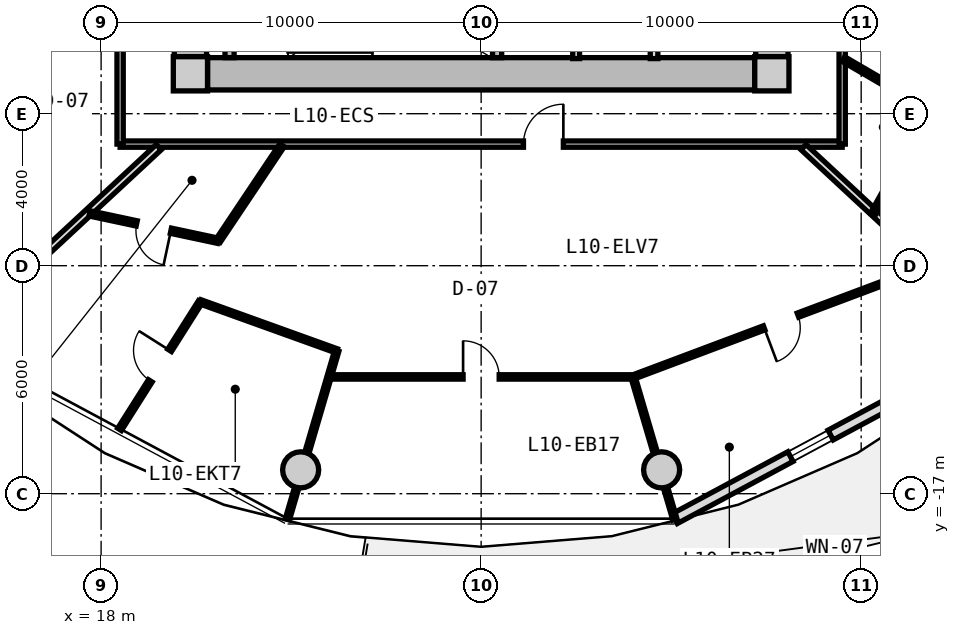
"""IFC4 building model, lengths in metres.
Left out: names, types, materials, properties, quantities, classifications, styles, units other than length and angle.
Written with IfcOpenShell. Run it as: python <this file> out.ifc"""

import sys

from ifc_helpers import new_model, si_unit, direction, frame, frame_2d, origin, origin_2d, place, context, subcontext, project, spatial, rectangle, circle, extrude, source, transform, mapped, element, fill, save


model = new_model("IFC4")
c1 = context("Model", 3, precision=1e-05, world=origin(), true_north=direction((0.0, 1.0)))
c2 = subcontext(c1, "Body", "Model", "MODEL_VIEW")
j1 = project(units=[si_unit("LENGTHUNIT", "METRE"), si_unit("PLANEANGLEUNIT", "RADIAN")], contexts=[c1])
p1 = place(None, origin())
s1 = spatial("IfcSite", under=j1, at=p1, CompositionType="ELEMENT")
p2 = place(p1, origin())
s2 = spatial("IfcBuilding", under=s1, at=p2, CompositionType="ELEMENT")
p3 = place(p2, frame((0.0, 0.0, 36.85)))
s3 = spatial("IfcBuildingStorey", under=s2, at=p3, CompositionType="ELEMENT", Elevation=36.85)
m1 = source(origin(), c2, "Body", "SweptSolid", [
    extrude(rectangle(XDim=0.9, YDim=0.9, at=origin_2d()), origin(), (0.0, 0.0, 1.0), 3.05),
])
for number, where, z_axis, x_axis in (
    (1, (20.35, -5.95, 0.0), (0.0, 0.0, 1.0), (1.0, 0.0, 0.0)),
    (2, (35.65, -5.95, 0.0), (0.0, 0.0, 1.0), (1.0, 0.0, 0.0)),
):
    element("IfcColumn", number, at=place(p3, frame(where, z_axis=z_axis, x_axis=x_axis)), inside=s3, PredefinedType="COLUMN", context=c2, shape_type="MappedRepresentation", body=[
        mapped(m1, transform((0.0, 0.0, 0.0), x_axis=(1.0, 0.0, 0.0), y_axis=(0.0, 1.0, 0.0), z_axis=(0.0, 0.0, 1.0), scale=1.0)),
    ])
m2 = source(origin(), c2, "Body", "SweptSolid", [
    extrude(rectangle(XDim=14.4, YDim=0.85, at=frame_2d((7.2, 0.0))), origin(), (0.0, 0.0, 1.0), 2.79),
])
p4 = place(p3, frame((35.2, -5.95, 0.0), z_axis=(0.0, 0.0, 1.0), x_axis=(-1.0, 0.0, 0.0)))
e3 = element("IfcWall", 3, at=p4, inside=s3, PredefinedType="SHEAR", context=c2, shape_type="MappedRepresentation", body=[
    mapped(m2, transform((0.0, 0.0, 0.0), x_axis=(1.0, 0.0, 0.0), y_axis=(0.0, 1.0, 0.0), z_axis=(0.0, 0.0, 1.0), scale=1.0)),
])
m3 = source(origin(), c2, "Body", "SweptSolid", [
    extrude(rectangle(XDim=11.0, YDim=0.85, at=frame_2d((5.5, 0.0))), origin(), (0.0, 0.0, 1.0), 2.79),
])
p5 = place(p3, frame((20.35, -5.5, 0.0), z_axis=(0.0, 0.0, 1.0), x_axis=(0.0, 1.0, 0.0)))
e4 = element("IfcWall", 4, at=p5, inside=s3, PredefinedType="SHEAR", context=c2, shape_type="MappedRepresentation", body=[
    mapped(m3, transform((0.0, 0.0, 0.0), x_axis=(1.0, 0.0, 0.0), y_axis=(0.0, 1.0, 0.0), z_axis=(0.0, 0.0, 1.0), scale=1.0)),
])
p6 = place(p5, frame((3.8, 0.0, 0.0)))
e5 = element("IfcOpeningElement", 5, at=p6, cuts=e4, PredefinedType="OPENING", context=c2, shape_type="SweptSolid", body=[
    extrude(rectangle(XDim=1.2, YDim=2.15, at=frame_2d((0.6, 1.075))), frame((0.0, 0.435, 0.0), z_axis=(0.0, -1.0, 0.0), x_axis=(1.0, 0.0, 0.0)), (0.0, 0.0, 1.0), 0.87),
])
p7 = place(p3, frame((35.65, 5.5, 0.0), z_axis=(0.0, 0.0, 1.0), x_axis=(0.0, -1.0, 0.0)))
e6 = element("IfcWall", 6, at=p7, inside=s3, PredefinedType="SHEAR", context=c2, shape_type="MappedRepresentation", body=[
    mapped(m3, transform((0.0, 0.0, 0.0), x_axis=(1.0, 0.0, 0.0), y_axis=(0.0, 1.0, 0.0), z_axis=(0.0, 0.0, 1.0), scale=1.0)),
])
p8 = place(p7, frame((5.65, 0.0, 0.0)))
e7 = element("IfcOpeningElement", 7, at=p8, cuts=e6, PredefinedType="OPENING", context=c2, shape_type="SweptSolid", body=[
    extrude(rectangle(XDim=1.2, YDim=2.15, at=frame_2d((0.6, 1.075))), frame((0.0, 0.435, 0.0), z_axis=(0.0, -1.0, 0.0), x_axis=(1.0, 0.0, 0.0)), (0.0, 0.0, 1.0), 0.87),
])
p9 = place(p7, frame((9.3, 0.0, 0.0)))
e8 = element("IfcOpeningElement", 8, at=p9, cuts=e6, PredefinedType="OPENING", context=c2, shape_type="SweptSolid", body=[
    extrude(rectangle(XDim=1.0, YDim=2.1, at=frame_2d((0.5, 1.05))), frame((0.0, 0.435, 0.0), z_axis=(0.0, -1.0, 0.0), x_axis=(1.0, 0.0, 0.0)), (0.0, 0.0, 1.0), 0.87),
])
m4 = source(origin(), c2, "Body", "SweptSolid", [
    extrude(circle(Radius=0.475, at=origin_2d()), origin(), (0.0, 0.0, 1.0), 3.05),
])
for number, where, z_axis, x_axis in (
    (9, (23.251, -16.373, 0.0), (0.0, 0.0, 1.0), (1.0, 0.0, 0.0)),
    (10, (32.749, -16.373, 0.0), (0.0, 0.0, 1.0), (1.0, 0.0, 0.0)),
):
    element("IfcColumn", number, at=place(p3, frame(where, z_axis=z_axis, x_axis=x_axis)), inside=s3, PredefinedType="COLUMN", context=c2, shape_type="MappedRepresentation", body=[
        mapped(m4, transform((0.0, 0.0, 0.0), x_axis=(1.0, 0.0, 0.0), y_axis=(0.0, 1.0, 0.0), z_axis=(0.0, 0.0, 1.0), scale=1.0)),
    ])
m5 = source(origin(), c2, "Body", "SweptSolid", [
    extrude(rectangle(XDim=10.011, YDim=0.29, at=frame_2d((5.005, 0.0))), origin(), (0.0, 0.0, 1.0), 2.79),
])
p10 = place(p3, frame((41.916, -12.926, 0.0), z_axis=(0.0, 0.0, 1.0), x_axis=(-0.881272505317, -0.472608475773, 0.0)))
e11 = element("IfcWall", 11, at=p10, inside=s3, PredefinedType="SOLIDWALL", context=c2, shape_type="MappedRepresentation", body=[
    mapped(m5, transform((0.0, 0.0, 0.0), x_axis=(1.0, 0.0, 0.0), y_axis=(0.0, 1.0, 0.0), z_axis=(0.0, 0.0, 1.0), scale=1.0)),
])
p11 = place(p10, frame((1.06, 0.0, 0.0)))
e12 = element("IfcOpeningElement", 12, at=p11, cuts=e11, PredefinedType="OPENING", context=c2, shape_type="SweptSolid", body=[
    extrude(rectangle(XDim=1.15, YDim=2.25, at=frame_2d((0.575, 1.125))), frame((0.0, 0.155, 0.0), z_axis=(0.0, -1.0, 0.0), x_axis=(1.0, 0.0, 0.0)), (0.0, 0.0, 1.0), 0.31),
])
p12 = place(p10, frame((5.355, 0.0, 0.85)))
e13 = element("IfcOpeningElement", 13, at=p12, cuts=e11, PredefinedType="OPENING", context=c2, shape_type="SweptSolid", body=[
    extrude(rectangle(XDim=1.2, YDim=1.5, at=frame_2d((0.6, 0.75))), frame((0.0, 0.155, 0.0), z_axis=(0.0, -1.0, 0.0), x_axis=(1.0, 0.0, 0.0)), (0.0, 0.0, 1.0), 0.31),
])
m6 = source(origin(), c2, "Body", "SweptSolid", [
    extrude(rectangle(XDim=3.075, YDim=0.24, at=frame_2d((1.538, 0.0))), origin(), (0.0, 0.0, 1.0), 2.79),
])
for number, where, z_axis, x_axis in (
    (14, (21.38, -5.525, 0.0), (0.0, 0.0, 1.0), (0.0, 1.0, 0.0)),
    (15, (28.42, -5.525, 0.0), (0.0, 0.0, 1.0), (0.0, 1.0, 0.0)),
):
    element("IfcWall", number, at=place(p3, frame(where, z_axis=z_axis, x_axis=x_axis)), inside=s3, PredefinedType="PARTITIONING", context=c2, shape_type="MappedRepresentation", body=[
        mapped(m6, transform((0.0, 0.0, 0.0), x_axis=(1.0, 0.0, 0.0), y_axis=(0.0, 1.0, 0.0), z_axis=(0.0, 0.0, 1.0), scale=1.0)),
    ])
m7 = source(origin(), c2, "Body", "SweptSolid", [
    extrude(rectangle(XDim=3.8, YDim=0.2, at=frame_2d((1.9, 0.0))), origin(), (0.0, 0.0, 1.0), 2.775),
])
p13 = place(p3, frame((32.55, -5.55, 0.0), z_axis=(0.0, 0.0, 1.0), x_axis=(0.0, 1.0, 0.0)))
e16 = element("IfcWall", 16, at=p13, inside=s3, PredefinedType="PARTITIONING", context=c2, shape_type="MappedRepresentation", body=[
    mapped(m7, transform((0.0, 0.0, 0.0), x_axis=(1.0, 0.0, 0.0), y_axis=(0.0, 1.0, 0.0), z_axis=(0.0, 0.0, 1.0), scale=1.0)),
])
m8 = source(origin(), c2, "Body", "SweptSolid", [
    extrude(rectangle(XDim=3.22, YDim=0.18, at=frame_2d((1.61, 0.0))), origin(), (0.0, 0.0, 1.0), 2.775),
])
p14 = place(p3, frame((30.5, -5.55, 0.0), z_axis=(0.0, 0.0, 1.0), x_axis=(0.0, 1.0, 0.0)))
e17 = element("IfcWall", 17, at=p14, inside=s3, PredefinedType="PARTITIONING", context=c2, shape_type="MappedRepresentation", body=[
    mapped(m8, transform((0.0, 0.0, 0.0), x_axis=(1.0, 0.0, 0.0), y_axis=(0.0, 1.0, 0.0), z_axis=(0.0, 0.0, 1.0), scale=1.0)),
])
m9 = source(origin(), c2, "Body", "SweptSolid", [
    extrude(rectangle(XDim=19.0, YDim=0.165, at=frame_2d((9.5, 0.0))), origin(), (0.0, 0.0, 1.0), 2.775),
])
p15 = place(p3, frame((37.5, -7.8, 0.0), z_axis=(0.0, 0.0, 1.0), x_axis=(-1.0, 0.0, 0.0)))
e18 = element("IfcWall", 18, at=p15, inside=s3, PredefinedType="PARTITIONING", context=c2, shape_type="MappedRepresentation", body=[
    mapped(m9, transform((0.0, 0.0, 0.0), x_axis=(1.0, 0.0, 0.0), y_axis=(0.0, 1.0, 0.0), z_axis=(0.0, 0.0, 1.0), scale=1.0)),
])
p16 = place(p15, frame((7.336, 0.0, 0.0)))
e19 = element("IfcOpeningElement", 19, at=p16, cuts=e18, PredefinedType="OPENING", context=c2, shape_type="SweptSolid", body=[
    extrude(rectangle(XDim=1.05, YDim=2.15, at=frame_2d((0.525, 1.075))), frame((0.0, 0.093, 0.0), z_axis=(0.0, -1.0, 0.0), x_axis=(1.0, 0.0, 0.0)), (0.0, 0.0, 1.0), 0.185),
])
m10 = source(origin(), c2, "Body", "SweptSolid", [
    extrude(rectangle(XDim=15.6, YDim=0.165, at=frame_2d((7.8, 0.0))), origin(), (0.0, 0.0, 1.0), 2.775),
])
p17 = place(p3, frame((18.5, -7.8, 0.0), z_axis=(0.0, 0.0, 1.0), x_axis=(0.0, 1.0, 0.0)))
e20 = element("IfcWall", 20, at=p17, inside=s3, PredefinedType="PARTITIONING", context=c2, shape_type="MappedRepresentation", body=[
    mapped(m10, transform((0.0, 0.0, 0.0), x_axis=(1.0, 0.0, 0.0), y_axis=(0.0, 1.0, 0.0), z_axis=(0.0, 0.0, 1.0), scale=1.0)),
])
p18 = place(p17, frame((12.141, 0.0, 0.0)))
e21 = element("IfcOpeningElement", 21, at=p18, cuts=e20, PredefinedType="OPENING", context=c2, shape_type="SweptSolid", body=[
    extrude(rectangle(XDim=1.25, YDim=2.2, at=frame_2d((0.625, 1.1))), frame((0.0, 0.093, 0.0), z_axis=(0.0, -1.0, 0.0), x_axis=(1.0, 0.0, 0.0)), (0.0, 0.0, 1.0), 0.185),
])
p19 = place(p17, frame((3.63, 0.0, 0.0)))
e22 = element("IfcOpeningElement", 22, at=p19, cuts=e20, PredefinedType="OPENING", context=c2, shape_type="SweptSolid", body=[
    extrude(rectangle(XDim=1.05, YDim=2.15, at=frame_2d((0.525, 1.075))), frame((0.0, 0.093, 0.0), z_axis=(0.0, -1.0, 0.0), x_axis=(1.0, 0.0, 0.0)), (0.0, 0.0, 1.0), 0.185),
])
p20 = place(p3, frame((37.5, 7.8, 0.0), z_axis=(0.0, 0.0, 1.0), x_axis=(0.0, -1.0, 0.0)))
e23 = element("IfcWall", 23, at=p20, inside=s3, PredefinedType="PARTITIONING", context=c2, shape_type="MappedRepresentation", body=[
    mapped(m10, transform((0.0, 0.0, 0.0), x_axis=(1.0, 0.0, 0.0), y_axis=(0.0, 1.0, 0.0), z_axis=(0.0, 0.0, 1.0), scale=1.0)),
])
p21 = place(p20, frame((6.269, 0.0, 0.0)))
e24 = element("IfcOpeningElement", 24, at=p21, cuts=e23, PredefinedType="OPENING", context=c2, shape_type="SweptSolid", body=[
    extrude(rectangle(XDim=1.05, YDim=2.15, at=frame_2d((0.525, 1.075))), frame((0.0, 0.093, 0.0), z_axis=(0.0, -1.0, 0.0), x_axis=(1.0, 0.0, 0.0)), (0.0, 0.0, 1.0), 0.185),
])
m11 = source(origin(), c2, "Body", "SweptSolid", [
    extrude(rectangle(XDim=7.435, YDim=0.19, at=frame_2d((3.717, 0.0))), origin(), (0.0, 0.0, 1.0), 2.225),
])
for number, where, z_axis, x_axis in (
    (25, (19.517, -7.88, 0.0), (0.0, 0.0, 1.0), (-0.733, -0.681, 0.0)),
    (26, (36.483, -7.88, 0.0), (0.0, 0.0, 1.0), (0.733, -0.681, 0.0)),
):
    element("IfcWall", number, at=place(p3, frame(where, z_axis=z_axis, x_axis=x_axis)), inside=s3, PredefinedType="PARTITIONING", context=c2, shape_type="MappedRepresentation", body=[
        mapped(m11, transform((0.0, 0.0, 0.0), x_axis=(1.0, 0.0, 0.0), y_axis=(0.0, 1.0, 0.0), z_axis=(0.0, 0.0, 1.0), scale=1.0)),
    ])
m12 = source(origin(), c2, "Body", "SweptSolid", [
    extrude(rectangle(XDim=7.993, YDim=0.115, at=frame_2d((3.996, 0.0))), origin(), (0.0, 0.0, 1.0), 2.775),
])
p22 = place(p3, frame((24.004, -13.927, 0.0), z_axis=(0.0, 0.0, 1.0), x_axis=(1.0, 0.0, 0.0)))
e27 = element("IfcWall", 27, at=p22, inside=s3, PredefinedType="PARTITIONING", context=c2, shape_type="MappedRepresentation", body=[
    mapped(m12, transform((0.0, 0.0, 0.0), x_axis=(1.0, 0.0, 0.0), y_axis=(0.0, 1.0, 0.0), z_axis=(0.0, 0.0, 1.0), scale=1.0)),
])
p23 = place(p22, frame((3.521, 0.0, 0.0)))
e28 = element("IfcOpeningElement", 28, at=p23, cuts=e27, PredefinedType="OPENING", context=c2, shape_type="SweptSolid", body=[
    extrude(rectangle(XDim=0.95, YDim=2.1, at=frame_2d((0.475, 1.05))), frame((0.0, 0.067, 0.0), z_axis=(0.0, -1.0, 0.0), x_axis=(1.0, 0.0, 0.0)), (0.0, 0.0, 1.0), 0.135),
])
m13 = source(origin(), c2, "Body", "SweptSolid", [
    extrude(rectangle(XDim=4.625, YDim=0.115, at=frame_2d((2.312, 0.0))), origin(), (0.0, 0.0, 1.0), 2.225),
])
p24 = place(p3, frame((24.201, -13.239, 0.0), z_axis=(0.0, 0.0, 1.0), x_axis=(-0.2810742844, -0.959686014616, 0.0)))
e29 = element("IfcWall", 29, at=p24, inside=s3, PredefinedType="PARTITIONING", context=c2, shape_type="MappedRepresentation", body=[
    mapped(m13, transform((0.0, 0.0, 0.0), x_axis=(1.0, 0.0, 0.0), y_axis=(0.0, 1.0, 0.0), z_axis=(0.0, 0.0, 1.0), scale=1.0)),
])
m14 = source(origin(), c2, "Body", "SweptSolid", [
    extrude(rectangle(XDim=8.32, YDim=0.115, at=frame_2d((4.16, 0.0))), origin(), (0.0, 0.0, 1.0), 2.775),
])
p25 = place(p3, frame((31.997, -13.93, 0.0), z_axis=(0.0, 0.0, 1.0), x_axis=(0.936180763098, 0.351518959382, 0.0)))
e30 = element("IfcWall", 30, at=p25, inside=s3, PredefinedType="PARTITIONING", context=c2, shape_type="MappedRepresentation", body=[
    mapped(m14, transform((0.0, 0.0, 0.0), x_axis=(1.0, 0.0, 0.0), y_axis=(0.0, 1.0, 0.0), z_axis=(0.0, 0.0, 1.0), scale=1.0)),
])
p26 = place(p25, frame((3.685, 0.0, 0.0)))
e31 = element("IfcOpeningElement", 31, at=p26, cuts=e30, PredefinedType="OPENING", context=c2, shape_type="SweptSolid", body=[
    extrude(rectangle(XDim=0.95, YDim=2.1, at=frame_2d((0.475, 1.05))), frame((0.0, 0.067, 0.0), z_axis=(0.0, -1.0, 0.0), x_axis=(1.0, 0.0, 0.0)), (0.0, 0.0, 1.0), 0.135),
])
m15 = source(origin(), c2, "Body", "SweptSolid", [
    extrude(rectangle(XDim=3.905, YDim=0.115, at=frame_2d((1.952, 0.0))), origin(), (0.0, 0.0, 1.0), 2.225),
])
p27 = place(p3, frame((31.997, -13.93, 0.0), z_axis=(0.0, 0.0, 1.0), x_axis=(0.282037692958, -0.959403324859, 0.0)))
e32 = element("IfcWall", 32, at=p27, inside=s3, PredefinedType="PARTITIONING", context=c2, shape_type="MappedRepresentation", body=[
    mapped(m15, transform((0.0, 0.0, 0.0), x_axis=(1.0, 0.0, 0.0), y_axis=(0.0, 1.0, 0.0), z_axis=(0.0, 0.0, 1.0), scale=1.0)),
])
m16 = source(origin(), c2, "Body", "SweptSolid", [
    extrude(rectangle(XDim=3.025, YDim=0.14, at=frame_2d((1.513, 0.0))), origin(), (0.0, 0.0, 1.0), 2.775),
])
p28 = place(p3, frame((22.76, -7.83, 0.0), z_axis=(0.0, 0.0, 1.0), x_axis=(-0.556189165904, -0.831055721195, 0.0)))
e33 = element("IfcWall", 33, at=p28, inside=s3, PredefinedType="PARTITIONING", context=c2, shape_type="MappedRepresentation", body=[
    mapped(m16, transform((0.0, 0.0, 0.0), x_axis=(1.0, 0.0, 0.0), y_axis=(0.0, 1.0, 0.0), z_axis=(0.0, 0.0, 1.0), scale=1.0)),
])
m17 = source(origin(), c2, "Body", "SweptSolid", [
    extrude(rectangle(XDim=3.459, YDim=0.14, at=frame_2d((1.729, 0.0))), origin(), (0.0, 0.0, 1.0), 2.775),
])
p29 = place(p3, frame((21.078, -10.344, 0.0), z_axis=(0.0, 0.0, 1.0), x_axis=(-0.978006468578, 0.208574560815, 0.0)))
e34 = element("IfcWall", 34, at=p29, inside=s3, PredefinedType="PARTITIONING", context=c2, shape_type="MappedRepresentation", body=[
    mapped(m17, transform((0.0, 0.0, 0.0), x_axis=(1.0, 0.0, 0.0), y_axis=(0.0, 1.0, 0.0), z_axis=(0.0, 0.0, 1.0), scale=1.0)),
])
p30 = place(p29, frame((1.27, 0.0, 0.0)))
e35 = element("IfcOpeningElement", 35, at=p30, cuts=e34, PredefinedType="OPENING", context=c2, shape_type="SweptSolid", body=[
    extrude(rectangle(XDim=0.92, YDim=2.1, at=frame_2d((0.46, 1.05))), frame((0.0, 0.08, 0.0), z_axis=(0.0, -1.0, 0.0), x_axis=(1.0, 0.0, 0.0)), (0.0, 0.0, 1.0), 0.16),
])
m18 = source(origin(), c2, "Body", "SweptSolid", [
    extrude(rectangle(XDim=3.974, YDim=0.115, at=frame_2d((1.987, 0.0))), origin(), (0.0, 0.0, 1.0), 2.775),
])
p31 = place(p3, frame((20.611, -11.95, 0.0), z_axis=(0.0, 0.0, 1.0), x_axis=(-0.534810918023, -0.844971764003, 0.0)))
e36 = element("IfcWall", 36, at=p31, inside=s3, PredefinedType="PARTITIONING", context=c2, shape_type="MappedRepresentation", body=[
    mapped(m18, transform((0.0, 0.0, 0.0), x_axis=(1.0, 0.0, 0.0), y_axis=(0.0, 1.0, 0.0), z_axis=(0.0, 0.0, 1.0), scale=1.0)),
])
p32 = place(p31, frame((1.512, 0.0, 0.0)))
e37 = element("IfcOpeningElement", 37, at=p32, cuts=e36, PredefinedType="OPENING", context=c2, shape_type="SweptSolid", body=[
    extrude(rectangle(XDim=0.95, YDim=2.1, at=frame_2d((0.475, 1.05))), frame((0.0, 0.067, 0.0), z_axis=(0.0, -1.0, 0.0), x_axis=(1.0, 0.0, 0.0)), (0.0, 0.0, 1.0), 0.135),
])
m19 = source(origin(), c2, "Body", "SweptSolid", [
    extrude(rectangle(XDim=3.814, YDim=0.115, at=frame_2d((1.907, 0.0))), origin(), (0.0, 0.0, 1.0), 2.775),
])
p33 = place(p3, frame((20.611, -11.95, 0.0), z_axis=(0.0, 0.0, 1.0), x_axis=(0.940935542004, -0.338585743637, 0.0)))
e38 = element("IfcWall", 38, at=p33, inside=s3, PredefinedType="PARTITIONING", context=c2, shape_type="MappedRepresentation", body=[
    mapped(m19, transform((0.0, 0.0, 0.0), x_axis=(1.0, 0.0, 0.0), y_axis=(0.0, 1.0, 0.0), z_axis=(0.0, 0.0, 1.0), scale=1.0)),
])
m20 = source(origin(), c2, "Body", "SweptSolid", [
    extrude(rectangle(XDim=2.669, YDim=0.14, at=frame_2d((1.335, 0.0))), origin(), (0.0, 0.0, 1.0), 2.775),
])
p34 = place(p3, frame((37.53, -5.561, 0.0), z_axis=(0.0, 0.0, 1.0), x_axis=(0.86369928178, -0.50400749067, 0.0)))
e39 = element("IfcWall", 39, at=p34, inside=s3, PredefinedType="PARTITIONING", context=c2, shape_type="MappedRepresentation", body=[
    mapped(m20, transform((0.0, 0.0, 0.0), x_axis=(1.0, 0.0, 0.0), y_axis=(0.0, 1.0, 0.0), z_axis=(0.0, 0.0, 1.0), scale=1.0)),
])
m21 = source(origin(), c2, "Body", "SweptSolid", [
    extrude(rectangle(XDim=3.121, YDim=0.14, at=frame_2d((1.561, 0.0))), origin(), (0.0, 0.0, 1.0), 2.775),
])
p35 = place(p3, frame((39.836, -6.906, 0.0), z_axis=(0.0, 0.0, 1.0), x_axis=(-0.487302357327, -0.873233309342, 0.0)))
e40 = element("IfcWall", 40, at=p35, inside=s3, PredefinedType="PARTITIONING", context=c2, shape_type="MappedRepresentation", body=[
    mapped(m21, transform((0.0, 0.0, 0.0), x_axis=(1.0, 0.0, 0.0), y_axis=(0.0, 1.0, 0.0), z_axis=(0.0, 0.0, 1.0), scale=1.0)),
])
p36 = place(p35, frame((1.101, 0.0, 0.0)))
e41 = element("IfcOpeningElement", 41, at=p36, cuts=e40, PredefinedType="OPENING", context=c2, shape_type="SweptSolid", body=[
    extrude(rectangle(XDim=0.92, YDim=2.1, at=frame_2d((0.46, 1.05))), frame((0.0, 0.08, 0.0), z_axis=(0.0, -1.0, 0.0), x_axis=(1.0, 0.0, 0.0)), (0.0, 0.0, 1.0), 0.16),
])
m22 = source(origin(), c2, "Body", "SweptSolid", [
    extrude(rectangle(XDim=1.2, YDim=1.5, at=frame_2d((0.6, 0.75))), frame((0.0, 0.03, 0.0), z_axis=(0.0, -1.0, 0.0), x_axis=(1.0, 0.0, 0.0)), (0.0, 0.0, 1.0), 0.06),
])
p37 = place(p12, origin())
e42 = element("IfcWindow", 42, at=p37, inside=s3, PartitioningType="SINGLE_PANEL", PredefinedType="WINDOW", context=c2, shape_type="MappedRepresentation", body=[
    mapped(m22, transform((0.0, 0.0, 0.0), x_axis=(1.0, 0.0, 0.0), y_axis=(0.0, 1.0, 0.0), z_axis=(0.0, 0.0, 1.0), scale=1.0)),
])
fill(e13, e42)
m23 = source(origin(), c2, "Body", "SweptSolid", [
    extrude(rectangle(XDim=1.05, YDim=2.15, at=frame_2d((0.525, 1.075))), frame((0.0, 0.025, 0.0), z_axis=(0.0, -1.0, 0.0), x_axis=(1.0, 0.0, 0.0)), (0.0, 0.0, 1.0), 0.05),
])
p38 = place(p16, frame((1.05, 0.0, 0.0), z_axis=(0.0, 0.0, 1.0), x_axis=(-1.0, 0.0, 0.0)))
e43 = element("IfcDoor", 43, at=p38, inside=s3, OperationType="SINGLE_SWING_RIGHT", PredefinedType="DOOR", context=c2, shape_type="MappedRepresentation", body=[
    mapped(m23, transform((0.0, 0.0, 0.0), x_axis=(1.0, 0.0, 0.0), y_axis=(0.0, 1.0, 0.0), z_axis=(0.0, 0.0, 1.0), scale=1.0)),
])
fill(e19, e43)
m24 = source(origin(), c2, "Body", "SweptSolid", [
    extrude(rectangle(XDim=0.92, YDim=2.1, at=frame_2d((0.46, 1.05))), frame((0.0, 0.025, 0.0), z_axis=(0.0, -1.0, 0.0), x_axis=(1.0, 0.0, 0.0)), (0.0, 0.0, 1.0), 0.05),
])
p39 = place(p30, origin())
e44 = element("IfcDoor", 44, at=p39, inside=s3, OperationType="SINGLE_SWING_LEFT", PredefinedType="DOOR", context=c2, shape_type="MappedRepresentation", body=[
    mapped(m24, transform((0.0, 0.0, 0.0), x_axis=(1.0, 0.0, 0.0), y_axis=(0.0, 1.0, 0.0), z_axis=(0.0, 0.0, 1.0), scale=1.0)),
])
fill(e35, e44)
m25 = source(origin(), c2, "Body", "SweptSolid", [
    extrude(rectangle(XDim=0.95, YDim=2.1, at=frame_2d((0.475, 1.05))), frame((0.0, 0.025, 0.0), z_axis=(0.0, -1.0, 0.0), x_axis=(1.0, 0.0, 0.0)), (0.0, 0.0, 1.0), 0.05),
])
p40 = place(p32, frame((0.95, 0.0, 0.0), z_axis=(0.0, 0.0, 1.0), x_axis=(-1.0, 0.0, 0.0)))
e45 = element("IfcDoor", 45, at=p40, inside=s3, OperationType="SINGLE_SWING_RIGHT", PredefinedType="DOOR", context=c2, shape_type="MappedRepresentation", body=[
    mapped(m25, transform((0.0, 0.0, 0.0), x_axis=(1.0, 0.0, 0.0), y_axis=(0.0, 1.0, 0.0), z_axis=(0.0, 0.0, 1.0), scale=1.0)),
])
fill(e37, e45)
p41 = place(p23, origin())
e46 = element("IfcDoor", 46, at=p41, inside=s3, OperationType="SINGLE_SWING_LEFT", PredefinedType="DOOR", context=c2, shape_type="MappedRepresentation", body=[
    mapped(m25, transform((0.0, 0.0, 0.0), x_axis=(1.0, 0.0, 0.0), y_axis=(0.0, 1.0, 0.0), z_axis=(0.0, 0.0, 1.0), scale=1.0)),
])
fill(e28, e46)
p42 = place(p26, frame((0.95, 0.0, 0.0), z_axis=(0.0, 0.0, 1.0), x_axis=(-1.0, 0.0, 0.0)))
e47 = element("IfcDoor", 47, at=p42, inside=s3, OperationType="SINGLE_SWING_RIGHT", PredefinedType="DOOR", context=c2, shape_type="MappedRepresentation", body=[
    mapped(m25, transform((0.0, 0.0, 0.0), x_axis=(1.0, 0.0, 0.0), y_axis=(0.0, 1.0, 0.0), z_axis=(0.0, 0.0, 1.0), scale=1.0)),
])
fill(e31, e47)
save(model, sys.argv[1])
